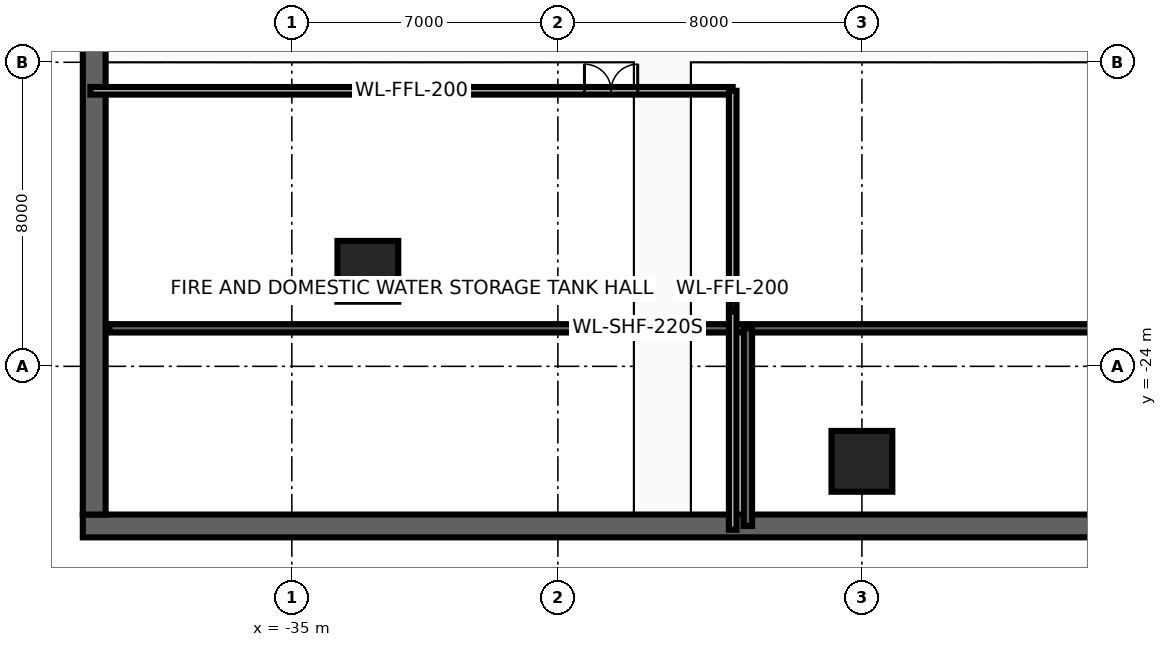
"""IFC4 building model, lengths in metres.
Left out: names, types, materials, properties, quantities, classifications, styles, units other than length and angle.
Written with IfcOpenShell. Run it as: python <this file> out.ifc"""

import sys

from ifc_helpers import new_model, si_unit, direction, frame, frame_2d, origin, origin_2d, place, context, subcontext, project, spatial, rectangle, extrude, source, transform, mapped, element, fill, save


model = new_model("IFC4")
c1 = context("Model", 3, precision=1e-05, world=origin(), true_north=direction((0.0, 1.0)))
c2 = subcontext(c1, "Body", "Model", "MODEL_VIEW")
j1 = project(units=[si_unit("LENGTHUNIT", "METRE"), si_unit("PLANEANGLEUNIT", "RADIAN")], contexts=[c1])
p1 = place(None, origin())
s1 = spatial("IfcSite", under=j1, at=p1, CompositionType="ELEMENT")
p2 = place(p1, origin())
s2 = spatial("IfcBuilding", under=s1, at=p2, CompositionType="ELEMENT")
p3 = place(p2, frame((0.0, 0.0, -9.6)))
s3 = spatial("IfcBuildingStorey", under=s2, at=p3, CompositionType="ELEMENT", Elevation=-9.6)
p4 = place(p3, frame((-40.5, -28.2, 0.0), z_axis=(0.0, 0.0, 1.0), x_axis=(1.0, 0.0, 0.0)))
e1 = element("IfcWall", 1, at=p4, inside=s3, PredefinedType="SOLIDWALL", context=c2, shape_type="SweptSolid", body=[
    extrude(rectangle(XDim=81.0, YDim=0.6, at=frame_2d((40.5, 0.0))), origin(), (0.0, 0.0, 1.0), 4.54),
])
p5 = place(p3, frame((-40.2, -27.9, 0.0), z_axis=(0.0, 0.0, 1.0), x_axis=(0.0, 1.0, 0.0)))
e2 = element("IfcWall", 2, at=p5, inside=s3, PredefinedType="SOLIDWALL", context=c2, shape_type="SweptSolid", body=[
    extrude(rectangle(XDim=55.8, YDim=0.6, at=frame_2d((27.9, 0.0))), origin(), (0.0, 0.0, 1.0), 4.54),
])
p6 = place(p3, frame((-39.8, -23.0, 0.0), z_axis=(0.0, 0.0, 1.0), x_axis=(1.0, 0.0, 0.0)))
e3 = element("IfcWall", 3, at=p6, inside=s3, PredefinedType="SHEAR", context=c2, shape_type="SweptSolid", body=[
    extrude(rectangle(XDim=27.8, YDim=0.22, at=frame_2d((13.9, 0.0))), origin(), (0.0, 0.0, 1.0), 4.54),
])
p7 = place(p3, frame((-23.0, -28.2, 0.0), z_axis=(0.0, 0.0, 1.0), x_axis=(0.0, 1.0, 0.0)))
e4 = element("IfcWall", 4, at=p7, inside=s3, PredefinedType="SHEAR", context=c2, shape_type="SweptSolid", body=[
    extrude(rectangle(XDim=5.2, YDim=0.22, at=frame_2d((2.6, 0.0))), origin(), (0.0, 0.0, 1.0), 4.54),
])
m1 = source(origin(), c2, "Body", "SweptSolid", [
    extrude(rectangle(XDim=1.6, YDim=1.6, at=origin_2d()), origin(), (0.0, 0.0, 1.0), 4.8),
])
for number, where, z_axis, x_axis in (
    (5, (-33.0, -21.5, 0.0), (0.0, 0.0, 1.0), (1.0, 0.0, 0.0)),
    (6, (-20.0, -26.5, 0.0), (0.0, 0.0, 1.0), (1.0, 0.0, 0.0)),
):
    element("IfcColumn", number, at=place(p3, frame(where, z_axis=z_axis, x_axis=x_axis)), inside=s3, PredefinedType="COLUMN", context=c2, shape_type="MappedRepresentation", body=[
        mapped(m1, transform((0.0, 0.0, 0.0), x_axis=(1.0, 0.0, 0.0), y_axis=(0.0, 1.0, 0.0), z_axis=(0.0, 0.0, 1.0), scale=1.0)),
    ])
p8 = place(p3, frame((-40.3, -16.75, 0.0), z_axis=(0.0, 0.0, 1.0), x_axis=(1.0, 0.0, 0.0)))
e7 = element("IfcWall", 7, at=p8, inside=s3, PredefinedType="PARTITIONING", context=c2, shape_type="SweptSolid", body=[
    extrude(rectangle(XDim=16.9, YDim=0.2, at=frame_2d((8.45, 0.0))), origin(), (0.0, 0.0, 1.0), 3.976),
])
p9 = place(p8, frame((13.0, 0.0, 0.0)))
e8 = element("IfcOpeningElement", 8, at=p9, cuts=e7, PredefinedType="OPENING", context=c2, shape_type="SweptSolid", body=[
    extrude(rectangle(XDim=1.4, YDim=2.15, at=frame_2d((0.7, 1.075))), frame((0.0, 0.115, 0.0), z_axis=(0.0, -1.0, 0.0), x_axis=(1.0, 0.0, 0.0)), (0.0, 0.0, 1.0), 0.23),
])
p10 = place(p3, frame((-23.4, -28.3, 0.0), z_axis=(0.0, 0.0, 1.0), x_axis=(0.0, 1.0, 0.0)))
e9 = element("IfcWall", 9, at=p10, inside=s3, PredefinedType="PARTITIONING", context=c2, shape_type="SweptSolid", body=[
    extrude(rectangle(XDim=11.55, YDim=0.2, at=frame_2d((5.775, 0.0))), origin(), (0.0, 0.0, 1.0), 4.54),
])
p11 = place(p9, origin())
e10 = element("IfcDoor", 10, at=p11, inside=s3, OperationType="DOUBLE_DOOR_SINGLE_SWING", PredefinedType="DOOR", context=c2, shape_type="SweptSolid", body=[
    extrude(rectangle(XDim=1.4, YDim=2.15, at=frame_2d((0.7, 1.075))), frame((0.0, 0.025, 0.0), z_axis=(0.0, -1.0, 0.0), x_axis=(1.0, 0.0, 0.0)), (0.0, 0.0, 1.0), 0.05),
])
fill(e8, e10)
save(model, sys.argv[1])
